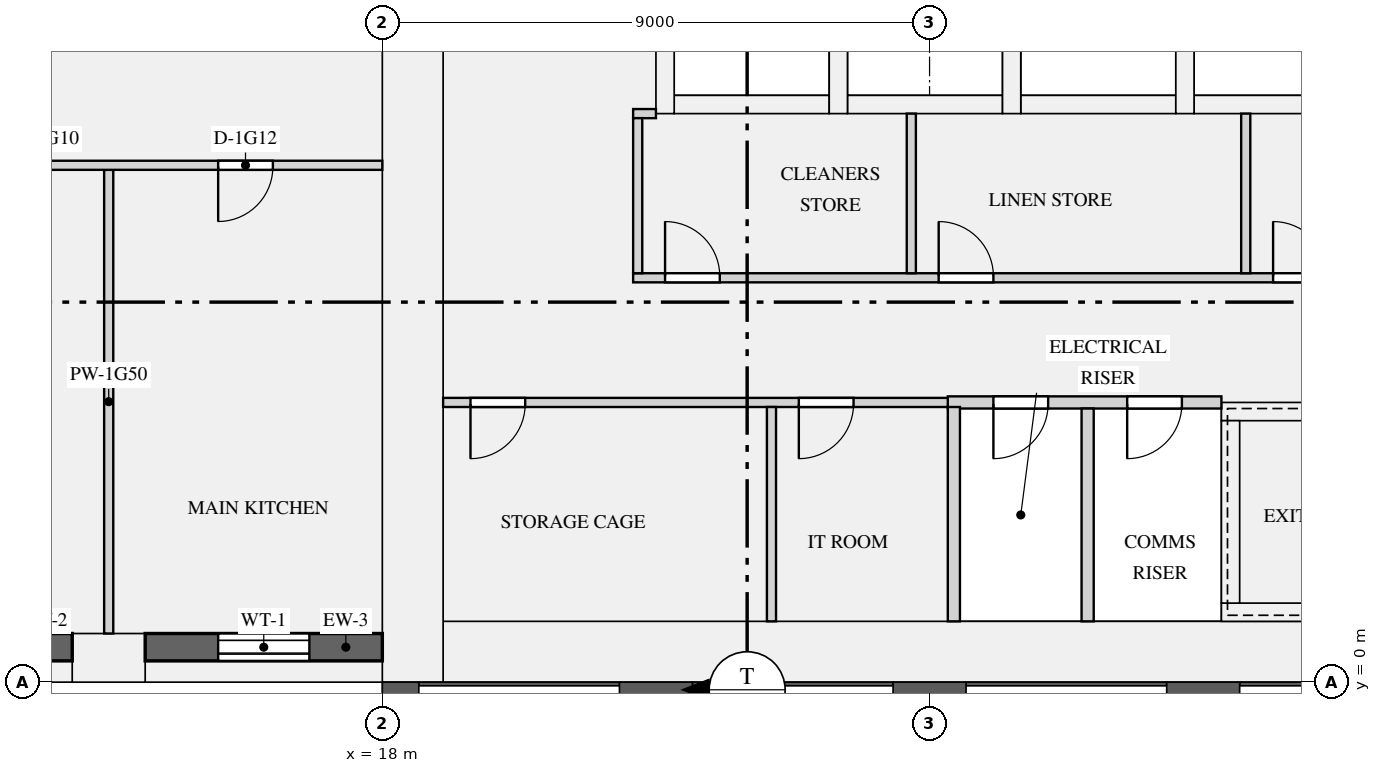
"""IFC4 building model, lengths in metres.
Left out: names, types, materials, properties, quantities, classifications, styles, units other than length and angle.
Written with IfcOpenShell. Run it as: python <this file> out.ifc"""

import sys

from ifc_helpers import new_model, si_unit, direction, frame, frame_2d, origin, origin_2d, place, context, subcontext, project, spatial, rectangle, extrude, element, fill, save


model = new_model("IFC4")
c1 = context("Model", 3, precision=1e-05, world=origin(), true_north=direction((0.0, 1.0)))
c2 = subcontext(c1, "Body", "Model", "MODEL_VIEW")
j1 = project(units=[si_unit("LENGTHUNIT", "METRE"), si_unit("PLANEANGLEUNIT", "RADIAN")], contexts=[c1])
p1 = place(None, origin())
s1 = spatial("IfcSite", under=j1, at=p1, CompositionType="ELEMENT")
p2 = place(p1, origin())
s2 = spatial("IfcBuilding", under=s1, at=p2, CompositionType="ELEMENT")
p3 = place(p2, frame((0.0, 0.0, 69.9)))
s3 = spatial("IfcBuildingStorey", under=s2, at=p3, CompositionType="ELEMENT", Elevation=69.9)
p4 = place(p3, frame((13.5, 0.4, 0.0), z_axis=(0.0, 0.0, 1.0), x_axis=(1.0, 0.0, 0.0)))
e1 = element("IfcColumn", 1, at=p4, inside=s3, PredefinedType="USERDEFINED", context=c2, shape_type="SweptSolid", body=[
    extrude(rectangle(XDim=1.2, YDim=0.8, at=origin_2d()), origin(), (0.0, 0.0, 1.0), 3.15),
])
p5 = place(p3, frame((18.5, 0.0, 0.0), z_axis=(0.0, 0.0, 1.0), x_axis=(0.0, 1.0, 0.0)))
e2 = element("IfcWall", 2, at=p5, inside=s3, PredefinedType="SHEAR", context=c2, shape_type="SweptSolid", body=[
    extrude(rectangle(XDim=12.5, YDim=1.0, at=frame_2d((6.25, 0.0))), origin(), (0.0, 0.0, 1.0), 3.15),
])
p6 = place(p3, frame((19.0, 0.5, 0.0), z_axis=(0.0, 0.0, 1.0), x_axis=(1.0, 0.0, 0.0)))
e3 = element("IfcWall", 3, at=p6, inside=s3, PredefinedType="SHEAR", context=c2, shape_type="SweptSolid", body=[
    extrude(rectangle(XDim=34.0, YDim=1.0, at=frame_2d((17.0, 0.0))), origin(), (0.0, 0.0, 1.0), 3.15),
])
p7 = place(p3, frame((22.8, 9.5, 0.0), z_axis=(0.0, 0.0, 1.0), x_axis=(1.0, 0.0, 0.0)))
e4 = element("IfcWall", 4, at=p7, inside=s3, PredefinedType="SHEAR", context=c2, shape_type="SweptSolid", body=[
    extrude(rectangle(XDim=2.55, YDim=0.3, at=frame_2d((1.275, 0.0))), origin(), (0.0, 0.0, 1.0), 3.15),
])
p8 = place(p3, frame((22.65, 9.35, 0.0), z_axis=(0.0, 0.0, 1.0), x_axis=(0.0, 1.0, 0.0)))
e5 = element("IfcWall", 5, at=p8, inside=s3, PredefinedType="SHEAR", context=c2, shape_type="SweptSolid", body=[
    extrude(rectangle(XDim=2.55, YDim=0.3, at=frame_2d((1.275, 0.0))), origin(), (0.0, 0.0, 1.0), 3.15),
])
p9 = place(p3, frame((25.65, 9.5, 0.0), z_axis=(0.0, 0.0, 1.0), x_axis=(1.0, 0.0, 0.0)))
e6 = element("IfcWall", 6, at=p9, inside=s3, PredefinedType="SHEAR", context=c2, shape_type="SweptSolid", body=[
    extrude(rectangle(XDim=2.55, YDim=0.3, at=frame_2d((1.275, 0.0))), origin(), (0.0, 0.0, 1.0), 3.15),
])
p10 = place(p3, frame((25.5, 9.35, 0.0), z_axis=(0.0, 0.0, 1.0), x_axis=(0.0, 1.0, 0.0)))
e7 = element("IfcWall", 7, at=p10, inside=s3, PredefinedType="SHEAR", context=c2, shape_type="SweptSolid", body=[
    extrude(rectangle(XDim=2.55, YDim=0.3, at=frame_2d((1.275, 0.0))), origin(), (0.0, 0.0, 1.0), 3.15),
])
p11 = place(p3, frame((28.5, 9.5, 0.0), z_axis=(0.0, 0.0, 1.0), x_axis=(1.0, 0.0, 0.0)))
e8 = element("IfcWall", 8, at=p11, inside=s3, PredefinedType="SHEAR", context=c2, shape_type="SweptSolid", body=[
    extrude(rectangle(XDim=2.55, YDim=0.3, at=frame_2d((1.275, 0.0))), origin(), (0.0, 0.0, 1.0), 3.15),
])
for number, where, z_axis, x_axis in (
    (9, (28.35, 9.35, 0.0), (0.0, 0.0, 1.0), (0.0, 1.0, 0.0)),
    (10, (31.35, 9.5, 0.0), (0.0, 0.0, 1.0), (1.0, 0.0, 0.0)),
    (11, (31.2, 9.35, 0.0), (0.0, 0.0, 1.0), (0.0, 1.0, 0.0)),
):
    element("IfcWall", number, at=place(p3, frame(where, z_axis=z_axis, x_axis=x_axis)), inside=s3, PredefinedType="SHEAR", context=c2, shape_type="SweptSolid", body=[
        extrude(rectangle(XDim=2.55, YDim=0.3, at=frame_2d((1.275, 0.0))), origin(), (0.0, 0.0, 1.0), 3.15),
    ])
p12 = place(p3, frame((31.8, 1.15, 0.0), z_axis=(0.0, 0.0, 1.0), x_axis=(1.0, 0.0, 0.0)))
e12 = element("IfcWall", 12, at=p12, inside=s3, PredefinedType="SHEAR", context=c2, shape_type="SweptSolid", body=[
    extrude(rectangle(XDim=8.4, YDim=0.3, at=frame_2d((4.2, 0.0))), origin(), (0.0, 0.0, 1.0), 3.15),
])
p13 = place(p3, frame((31.8, 4.45, 0.0), z_axis=(0.0, 0.0, 1.0), x_axis=(1.0, 0.0, 0.0)))
e13 = element("IfcWall", 13, at=p13, inside=s3, PredefinedType="SHEAR", context=c2, shape_type="SweptSolid", body=[
    extrude(rectangle(XDim=8.4, YDim=0.3, at=frame_2d((4.2, 0.0))), origin(), (0.0, 0.0, 1.0), 3.15),
])
p14 = place(p13, frame((6.8, 0.0, 0.0)))
e14 = element("IfcOpeningElement", 14, at=p14, cuts=e13, PredefinedType="OPENING", context=c2, shape_type="SweptSolid", body=[
    extrude(rectangle(XDim=1.1, YDim=2.1, at=frame_2d((0.55, 1.05))), frame((0.0, 0.16, 0.0), z_axis=(0.0, -1.0, 0.0), x_axis=(1.0, 0.0, 0.0)), (0.0, 0.0, 1.0), 0.32),
])
p15 = place(p3, frame((31.95, 1.3, 0.0), z_axis=(0.0, 0.0, 1.0), x_axis=(0.0, 1.0, 0.0)))
e15 = element("IfcWall", 15, at=p15, inside=s3, PredefinedType="SHEAR", context=c2, shape_type="SweptSolid", body=[
    extrude(rectangle(XDim=3.0, YDim=0.3, at=frame_2d((1.5, 0.0))), origin(), (0.0, 0.0, 1.0), 3.15),
])
p16 = place(p3, frame((9.6, 0.575, 0.9), z_axis=(0.0, 0.0, 1.0), x_axis=(1.0, 0.0, 0.0)))
e16 = element("IfcWall", 16, at=p16, inside=s3, PredefinedType="SOLIDWALL", context=c2, shape_type="SweptSolid", body=[
    extrude(rectangle(XDim=3.3, YDim=0.45, at=frame_2d((1.65, 0.0))), origin(), (0.0, 0.0, 1.0), 1.75),
])
p17 = place(p16, frame((0.9, 0.0, 0.15)))
e17 = element("IfcOpeningElement", 17, at=p17, cuts=e16, PredefinedType="OPENING", context=c2, shape_type="SweptSolid", body=[
    extrude(rectangle(XDim=1.5, YDim=1.5, at=frame_2d((0.75, 0.75))), frame((0.0, 0.235, 0.0), z_axis=(0.0, -1.0, 0.0), x_axis=(1.0, 0.0, 0.0)), (0.0, 0.0, 1.0), 0.47),
])
p18 = place(p3, frame((14.1, 0.575, 0.9), z_axis=(0.0, 0.0, 1.0), x_axis=(1.0, 0.0, 0.0)))
e18 = element("IfcWall", 18, at=p18, inside=s3, PredefinedType="SOLIDWALL", context=c2, shape_type="SweptSolid", body=[
    extrude(rectangle(XDim=3.9, YDim=0.45, at=frame_2d((1.95, 0.0))), origin(), (0.0, 0.0, 1.0), 1.75),
])
p19 = place(p18, frame((1.2, 0.0, 0.15)))
e19 = element("IfcOpeningElement", 19, at=p19, cuts=e18, PredefinedType="OPENING", context=c2, shape_type="SweptSolid", body=[
    extrude(rectangle(XDim=1.5, YDim=1.5, at=frame_2d((0.75, 0.75))), frame((0.0, 0.235, 0.0), z_axis=(0.0, -1.0, 0.0), x_axis=(1.0, 0.0, 0.0)), (0.0, 0.0, 1.0), 0.47),
])
p20 = place(p3, frame((27.3, 4.6, 0.0), z_axis=(0.0, 0.0, 1.0), x_axis=(1.0, 0.0, 0.0)))
e20 = element("IfcWall", 20, at=p20, inside=s3, PredefinedType="PARTITIONING", context=c2, shape_type="SweptSolid", body=[
    extrude(rectangle(XDim=4.5, YDim=0.2, at=frame_2d((2.25, 0.0))), origin(), (0.0, 0.0, 1.0), 2.65),
])
p21 = place(p20, frame((0.75, 0.0, 0.0)))
e21 = element("IfcOpeningElement", 21, at=p21, cuts=e20, PredefinedType="OPENING", context=c2, shape_type="SweptSolid", body=[
    extrude(rectangle(XDim=0.9, YDim=2.1, at=frame_2d((0.45, 1.05))), frame((0.0, 0.11, 0.0), z_axis=(0.0, -1.0, 0.0), x_axis=(1.0, 0.0, 0.0)), (0.0, 0.0, 1.0), 0.22),
])
p22 = place(p20, frame((2.95, 0.0, 0.0)))
e22 = element("IfcOpeningElement", 22, at=p22, cuts=e20, PredefinedType="OPENING", context=c2, shape_type="SweptSolid", body=[
    extrude(rectangle(XDim=0.9, YDim=2.1, at=frame_2d((0.45, 1.05))), frame((0.0, 0.11, 0.0), z_axis=(0.0, -1.0, 0.0), x_axis=(1.0, 0.0, 0.0)), (0.0, 0.0, 1.0), 0.22),
])
p23 = place(p3, frame((19.0, 4.6, 0.0), z_axis=(0.0, 0.0, 1.0), x_axis=(1.0, 0.0, 0.0)))
e23 = element("IfcWall", 23, at=p23, inside=s3, PredefinedType="PARTITIONING", context=c2, shape_type="SweptSolid", body=[
    extrude(rectangle(XDim=8.3, YDim=0.15, at=frame_2d((4.15, 0.0))), origin(), (0.0, 0.0, 1.0), 2.65),
])
p24 = place(p23, frame((0.45, 0.0, 0.0)))
e24 = element("IfcOpeningElement", 24, at=p24, cuts=e23, PredefinedType="OPENING", context=c2, shape_type="SweptSolid", body=[
    extrude(rectangle(XDim=0.9, YDim=2.1, at=frame_2d((0.45, 1.05))), frame((0.0, 0.085, 0.0), z_axis=(0.0, -1.0, 0.0), x_axis=(1.0, 0.0, 0.0)), (0.0, 0.0, 1.0), 0.17),
])
p25 = place(p23, frame((5.85, 0.0, 0.0)))
e25 = element("IfcOpeningElement", 25, at=p25, cuts=e23, PredefinedType="OPENING", context=c2, shape_type="SweptSolid", body=[
    extrude(rectangle(XDim=0.9, YDim=2.1, at=frame_2d((0.45, 1.05))), frame((0.0, 0.085, 0.0), z_axis=(0.0, -1.0, 0.0), x_axis=(1.0, 0.0, 0.0)), (0.0, 0.0, 1.0), 0.17),
])
p26 = place(p3, frame((22.125, 6.65, 0.0), z_axis=(0.0, 0.0, 1.0), x_axis=(1.0, 0.0, 0.0)))
e26 = element("IfcWall", 26, at=p26, inside=s3, PredefinedType="PARTITIONING", context=c2, shape_type="SweptSolid", body=[
    extrude(rectangle(XDim=20.4, YDim=0.15, at=frame_2d((10.2, 0.0))), origin(), (0.0, 0.0, 1.0), 2.65),
])
p27 = place(p26, frame((0.525, 0.0, 0.0)))
e27 = element("IfcOpeningElement", 27, at=p27, cuts=e26, PredefinedType="OPENING", context=c2, shape_type="SweptSolid", body=[
    extrude(rectangle(XDim=0.9, YDim=2.1, at=frame_2d((0.45, 1.05))), frame((0.0, 0.085, 0.0), z_axis=(0.0, -1.0, 0.0), x_axis=(1.0, 0.0, 0.0)), (0.0, 0.0, 1.0), 0.17),
])
p28 = place(p26, frame((5.025, 0.0, 0.0)))
e28 = element("IfcOpeningElement", 28, at=p28, cuts=e26, PredefinedType="OPENING", context=c2, shape_type="SweptSolid", body=[
    extrude(rectangle(XDim=0.9, YDim=2.1, at=frame_2d((0.45, 1.05))), frame((0.0, 0.085, 0.0), z_axis=(0.0, -1.0, 0.0), x_axis=(1.0, 0.0, 0.0)), (0.0, 0.0, 1.0), 0.17),
])
p29 = place(p26, frame((10.525, 0.0, 0.0)))
e29 = element("IfcOpeningElement", 29, at=p29, cuts=e26, PredefinedType="OPENING", context=c2, shape_type="SweptSolid", body=[
    extrude(rectangle(XDim=0.9, YDim=2.1, at=frame_2d((0.45, 1.05))), frame((0.0, 0.085, 0.0), z_axis=(0.0, -1.0, 0.0), x_axis=(1.0, 0.0, 0.0)), (0.0, 0.0, 1.0), 0.17),
])
p30 = place(p26, frame((14.025, 0.0, 0.0)))
e30 = element("IfcOpeningElement", 30, at=p30, cuts=e26, PredefinedType="OPENING", context=c2, shape_type="SweptSolid", body=[
    extrude(rectangle(XDim=0.9, YDim=2.1, at=frame_2d((0.45, 1.05))), frame((0.0, 0.085, 0.0), z_axis=(0.0, -1.0, 0.0), x_axis=(1.0, 0.0, 0.0)), (0.0, 0.0, 1.0), 0.17),
])
p31 = place(p26, frame((18.775, 0.0, 0.0)))
e31 = element("IfcOpeningElement", 31, at=p31, cuts=e26, PredefinedType="OPENING", context=c2, shape_type="SweptSolid", body=[
    extrude(rectangle(XDim=0.9, YDim=2.1, at=frame_2d((0.45, 1.05))), frame((0.0, 0.085, 0.0), z_axis=(0.0, -1.0, 0.0), x_axis=(1.0, 0.0, 0.0)), (0.0, 0.0, 1.0), 0.17),
])
p32 = place(p3, frame((22.125, 9.35, 0.0), z_axis=(0.0, 0.0, 1.0), x_axis=(1.0, 0.0, 0.0)))
e32 = element("IfcWall", 32, at=p32, inside=s3, PredefinedType="PARTITIONING", context=c2, shape_type="SweptSolid", body=[
    extrude(rectangle(XDim=0.375, YDim=0.15, at=frame_2d((0.188, 0.0))), origin(), (0.0, 0.0, 1.0), 2.65),
])
p33 = place(p3, frame((24.4, 1.0, 0.0), z_axis=(0.0, 0.0, 1.0), x_axis=(0.0, 1.0, 0.0)))
e33 = element("IfcWall", 33, at=p33, inside=s3, PredefinedType="PARTITIONING", context=c2, shape_type="SweptSolid", body=[
    extrude(rectangle(XDim=3.525, YDim=0.15, at=frame_2d((1.762, 0.0))), origin(), (0.0, 0.0, 1.0), 2.65),
])
p34 = place(p3, frame((27.4, 1.0, 0.0), z_axis=(0.0, 0.0, 1.0), x_axis=(0.0, 1.0, 0.0)))
e34 = element("IfcWall", 34, at=p34, inside=s3, PredefinedType="PARTITIONING", context=c2, shape_type="SweptSolid", body=[
    extrude(rectangle(XDim=3.525, YDim=0.2, at=frame_2d((1.762, 0.0))), origin(), (0.0, 0.0, 1.0), 2.65),
])
p35 = place(p3, frame((29.6, 1.0, 0.0), z_axis=(0.0, 0.0, 1.0), x_axis=(0.0, 1.0, 0.0)))
e35 = element("IfcWall", 35, at=p35, inside=s3, PredefinedType="PARTITIONING", context=c2, shape_type="SweptSolid", body=[
    extrude(rectangle(XDim=3.5, YDim=0.2, at=frame_2d((1.75, 0.0))), origin(), (0.0, 0.0, 1.0), 2.65),
])
p36 = place(p3, frame((22.2, 6.725, 0.0), z_axis=(0.0, 0.0, 1.0), x_axis=(0.0, 1.0, 0.0)))
e36 = element("IfcWall", 36, at=p36, inside=s3, PredefinedType="PARTITIONING", context=c2, shape_type="SweptSolid", body=[
    extrude(rectangle(XDim=2.55, YDim=0.15, at=frame_2d((1.275, 0.0))), origin(), (0.0, 0.0, 1.0), 2.65),
])
for number, where, z_axis, x_axis in (
    (37, (26.7, 6.725, 0.0), (0.0, 0.0, 1.0), (0.0, 1.0, 0.0)),
    (38, (32.2, 6.725, 0.0), (0.0, 0.0, 1.0), (0.0, 1.0, 0.0)),
):
    element("IfcWall", number, at=place(p3, frame(where, z_axis=z_axis, x_axis=x_axis)), inside=s3, PredefinedType="PARTITIONING", context=c2, shape_type="SweptSolid", body=[
        extrude(rectangle(XDim=2.625, YDim=0.15, at=frame_2d((1.312, 0.0))), origin(), (0.0, 0.0, 1.0), 2.65),
    ])
p37 = place(p3, frame((4.575, 8.5, 0.0), z_axis=(0.0, 0.0, 1.0), x_axis=(1.0, 0.0, 0.0)))
e39 = element("IfcWall", 39, at=p37, inside=s3, PredefinedType="PARTITIONING", context=c2, shape_type="SweptSolid", body=[
    extrude(rectangle(XDim=13.425, YDim=0.15, at=frame_2d((6.712, 0.0))), origin(), (0.0, 0.0, 1.0), 2.65),
])
p38 = place(p37, frame((10.725, 0.0, 0.0)))
e40 = element("IfcOpeningElement", 40, at=p38, cuts=e39, PredefinedType="OPENING", context=c2, shape_type="SweptSolid", body=[
    extrude(rectangle(XDim=0.9, YDim=2.1, at=frame_2d((0.45, 1.05))), frame((0.0, 0.085, 0.0), z_axis=(0.0, -1.0, 0.0), x_axis=(1.0, 0.0, 0.0)), (0.0, 0.0, 1.0), 0.17),
])
p39 = place(p37, frame((3.975, 0.0, 0.0)))
e41 = element("IfcOpeningElement", 41, at=p39, cuts=e39, PredefinedType="OPENING", context=c2, shape_type="SweptSolid", body=[
    extrude(rectangle(XDim=0.9, YDim=2.1, at=frame_2d((0.45, 1.05))), frame((0.0, 0.085, 0.0), z_axis=(0.0, -1.0, 0.0), x_axis=(1.0, 0.0, 0.0)), (0.0, 0.0, 1.0), 0.17),
])
p40 = place(p3, frame((13.5, 0.8, 0.0), z_axis=(0.0, 0.0, 1.0), x_axis=(0.0, 1.0, 0.0)))
e42 = element("IfcWall", 42, at=p40, inside=s3, PredefinedType="PARTITIONING", context=c2, shape_type="SweptSolid", body=[
    extrude(rectangle(XDim=7.625, YDim=0.15, at=frame_2d((3.812, 0.0))), origin(), (0.0, 0.0, 1.0), 2.65),
])
p41 = place(p19, origin())
e43 = element("IfcWindow", 43, at=p41, inside=s3, PartitioningType="SINGLE_PANEL", PredefinedType="WINDOW", context=c2, shape_type="SweptSolid", body=[
    extrude(rectangle(XDim=1.5, YDim=1.5, at=frame_2d((0.75, 0.75))), frame((0.0, -0.065, 0.0), z_axis=(0.0, -1.0, 0.0), x_axis=(1.0, 0.0, 0.0)), (0.0, 0.0, 1.0), 0.06),
])
fill(e19, e43)
p42 = place(p27, origin())
e44 = element("IfcDoor", 44, at=p42, inside=s3, OperationType="SINGLE_SWING_LEFT", PredefinedType="DOOR", context=c2, shape_type="SweptSolid", body=[
    extrude(rectangle(XDim=0.9, YDim=2.1, at=frame_2d((0.45, 1.05))), frame((0.0, 0.025, 0.0), z_axis=(0.0, -1.0, 0.0), x_axis=(1.0, 0.0, 0.0)), (0.0, 0.0, 1.0), 0.05),
])
fill(e27, e44)
p43 = place(p28, origin())
e45 = element("IfcDoor", 45, at=p43, inside=s3, OperationType="SINGLE_SWING_LEFT", PredefinedType="DOOR", context=c2, shape_type="SweptSolid", body=[
    extrude(rectangle(XDim=0.9, YDim=2.1, at=frame_2d((0.45, 1.05))), frame((0.0, 0.025, 0.0), z_axis=(0.0, -1.0, 0.0), x_axis=(1.0, 0.0, 0.0)), (0.0, 0.0, 1.0), 0.05),
])
fill(e28, e45)
p44 = place(p29, origin())
e46 = element("IfcDoor", 46, at=p44, inside=s3, OperationType="SINGLE_SWING_LEFT", PredefinedType="DOOR", context=c2, shape_type="SweptSolid", body=[
    extrude(rectangle(XDim=0.9, YDim=2.1, at=frame_2d((0.45, 1.05))), frame((0.0, 0.025, 0.0), z_axis=(0.0, -1.0, 0.0), x_axis=(1.0, 0.0, 0.0)), (0.0, 0.0, 1.0), 0.05),
])
fill(e29, e46)
p45 = place(p24, frame((0.9, 0.0, 0.0), z_axis=(0.0, 0.0, 1.0), x_axis=(-1.0, 0.0, 0.0)))
e47 = element("IfcDoor", 47, at=p45, inside=s3, OperationType="SINGLE_SWING_RIGHT", PredefinedType="DOOR", context=c2, shape_type="SweptSolid", body=[
    extrude(rectangle(XDim=0.9, YDim=2.1, at=frame_2d((0.45, 1.05))), frame((0.0, 0.025, 0.0), z_axis=(0.0, -1.0, 0.0), x_axis=(1.0, 0.0, 0.0)), (0.0, 0.0, 1.0), 0.05),
])
fill(e24, e47)
p46 = place(p25, frame((0.9, 0.0, 0.0), z_axis=(0.0, 0.0, 1.0), x_axis=(-1.0, 0.0, 0.0)))
e48 = element("IfcDoor", 48, at=p46, inside=s3, OperationType="SINGLE_SWING_RIGHT", PredefinedType="DOOR", context=c2, shape_type="SweptSolid", body=[
    extrude(rectangle(XDim=0.9, YDim=2.1, at=frame_2d((0.45, 1.05))), frame((0.0, 0.025, 0.0), z_axis=(0.0, -1.0, 0.0), x_axis=(1.0, 0.0, 0.0)), (0.0, 0.0, 1.0), 0.05),
])
fill(e25, e48)
p47 = place(p21, frame((0.9, 0.0, 0.0), z_axis=(0.0, 0.0, 1.0), x_axis=(-1.0, 0.0, 0.0)))
e49 = element("IfcDoor", 49, at=p47, inside=s3, OperationType="SINGLE_SWING_RIGHT", PredefinedType="DOOR", context=c2, shape_type="SweptSolid", body=[
    extrude(rectangle(XDim=0.9, YDim=2.1, at=frame_2d((0.45, 1.05))), frame((0.0, 0.025, 0.0), z_axis=(0.0, -1.0, 0.0), x_axis=(1.0, 0.0, 0.0)), (0.0, 0.0, 1.0), 0.05),
])
fill(e21, e49)
p48 = place(p22, frame((0.9, 0.0, 0.0), z_axis=(0.0, 0.0, 1.0), x_axis=(-1.0, 0.0, 0.0)))
e50 = element("IfcDoor", 50, at=p48, inside=s3, OperationType="SINGLE_SWING_RIGHT", PredefinedType="DOOR", context=c2, shape_type="SweptSolid", body=[
    extrude(rectangle(XDim=0.9, YDim=2.1, at=frame_2d((0.45, 1.05))), frame((0.0, 0.025, 0.0), z_axis=(0.0, -1.0, 0.0), x_axis=(1.0, 0.0, 0.0)), (0.0, 0.0, 1.0), 0.05),
])
fill(e22, e50)
p49 = place(p38, frame((0.9, 0.0, 0.0), z_axis=(0.0, 0.0, 1.0), x_axis=(-1.0, 0.0, 0.0)))
e51 = element("IfcDoor", 51, at=p49, inside=s3, OperationType="SINGLE_SWING_RIGHT", PredefinedType="DOOR", context=c2, shape_type="SweptSolid", body=[
    extrude(rectangle(XDim=0.9, YDim=2.1, at=frame_2d((0.45, 1.05))), frame((0.0, 0.025, 0.0), z_axis=(0.0, -1.0, 0.0), x_axis=(1.0, 0.0, 0.0)), (0.0, 0.0, 1.0), 0.05),
])
fill(e40, e51)
save(model, sys.argv[1])
